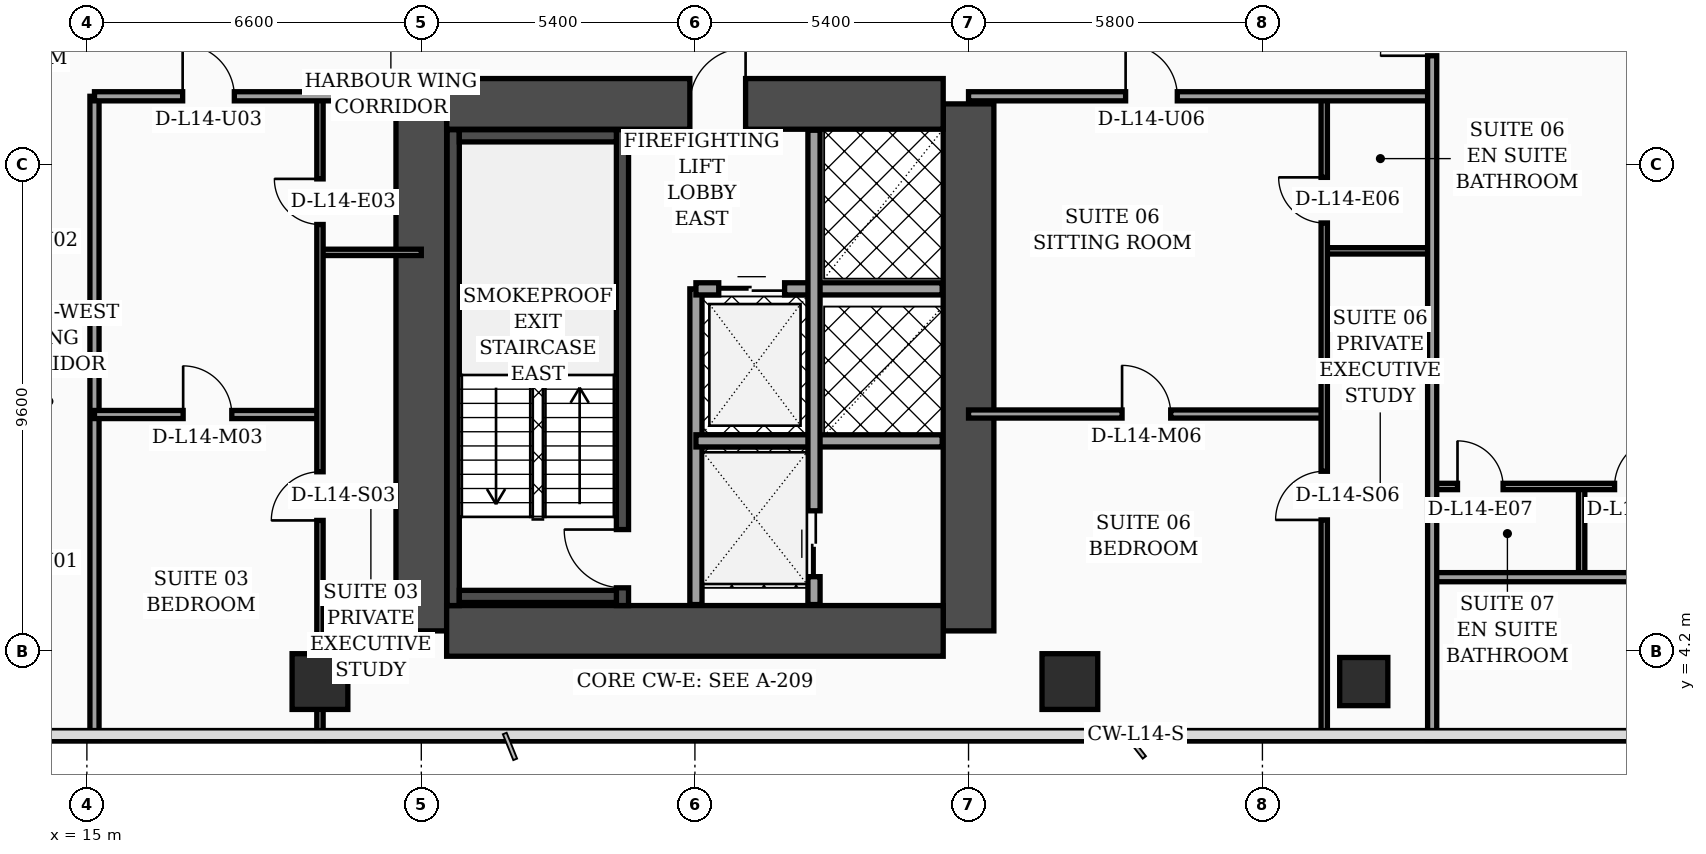
"""IFC4 building model, lengths in metres.
Left out: names, types, materials, properties, quantities, classifications, styles, units other than length and angle.
Written with IfcOpenShell. Run it as: python <this file> out.ifc"""

import sys

from ifc_helpers import new_model, si_unit, direction, frame, frame_2d, origin, origin_2d, place, context, subcontext, project, spatial, rectangle, hollow_rectangle, extrude, element, fill, save


model = new_model("IFC4")
c1 = context("Model", 3, precision=1e-05, world=origin(), true_north=direction((0.0, 1.0)))
c2 = subcontext(c1, "Body", "Model", "MODEL_VIEW")
j1 = project(units=[si_unit("LENGTHUNIT", "METRE"), si_unit("PLANEANGLEUNIT", "RADIAN")], contexts=[c1])
p1 = place(None, origin())
s1 = spatial("IfcSite", under=j1, at=p1, CompositionType="ELEMENT")
p2 = place(p1, origin())
s2 = spatial("IfcBuilding", under=s1, at=p2, CompositionType="ELEMENT")
p3 = place(p2, frame((0.0, 0.0, 62.2)))
s3 = spatial("IfcBuildingStorey", under=s2, at=p3, CompositionType="ELEMENT", Elevation=62.2)
for number, where, z_axis, x_axis in (
    (1, (21.6, 4.6, 0.0), (0.0, 0.0, 1.0), (0.0, 1.0, 0.0)),
    (2, (32.4, 4.6, 0.0), (0.0, 0.0, 1.0), (0.0, 1.0, 0.0)),
):
    element("IfcWall", number, at=place(p3, frame(where, z_axis=z_axis, x_axis=x_axis)), inside=s3, PredefinedType="SHEAR", context=c2, shape_type="SweptSolid", body=[
        extrude(rectangle(XDim=10.4, YDim=1.0, at=frame_2d((5.2, 0.0))), origin(), (0.0, 0.0, 1.0), 3.56),
    ])
p4 = place(p3, frame((22.1, 15.0, 0.0), z_axis=(0.0, 0.0, 1.0), x_axis=(1.0, 0.0, 0.0)))
e3 = element("IfcWall", 3, at=p4, inside=s3, PredefinedType="SHEAR", context=c2, shape_type="SweptSolid", body=[
    extrude(rectangle(XDim=9.8, YDim=1.0, at=frame_2d((4.9, 0.0))), origin(), (0.0, 0.0, 1.0), 3.56),
])
p5 = place(p4, frame((4.8, 0.0, 0.0)))
e4 = element("IfcOpeningElement", 4, at=p5, cuts=e3, PredefinedType="OPENING", context=c2, shape_type="SweptSolid", body=[
    extrude(rectangle(XDim=1.1, YDim=2.2, at=frame_2d((0.55, 1.1))), frame((0.0, 0.51, 0.0), z_axis=(0.0, -1.0, 0.0), x_axis=(1.0, 0.0, 0.0)), (0.0, 0.0, 1.0), 1.02),
])
p6 = place(p3, frame((22.1, 4.6, 0.0), z_axis=(0.0, 0.0, 1.0), x_axis=(1.0, 0.0, 0.0)))
e5 = element("IfcWall", 5, at=p6, inside=s3, PredefinedType="SHEAR", context=c2, shape_type="SweptSolid", body=[
    extrude(rectangle(XDim=9.8, YDim=1.0, at=frame_2d((4.9, 0.0))), origin(), (0.0, 0.0, 1.0), 3.56),
])
p7 = place(p3, frame((22.23, 5.1, 0.0), z_axis=(0.0, 0.0, 1.0), x_axis=(0.0, 1.0, 0.0)))
e6 = element("IfcWall", 6, at=p7, inside=s3, PredefinedType="SOLIDWALL", context=c2, shape_type="SweptSolid", body=[
    extrude(rectangle(XDim=9.39, YDim=0.24, at=frame_2d((4.695, 0.0))), origin(), (0.0, 0.0, 1.0), 3.56),
])
p8 = place(p3, frame((25.57, 5.1, 0.0), z_axis=(0.0, 0.0, 1.0), x_axis=(0.0, 1.0, 0.0)))
e7 = element("IfcWall", 7, at=p8, inside=s3, PredefinedType="SOLIDWALL", context=c2, shape_type="SweptSolid", body=[
    extrude(rectangle(XDim=9.39, YDim=0.24, at=frame_2d((4.695, 0.0))), origin(), (0.0, 0.0, 1.0), 3.56),
])
p9 = place(p8, frame((0.35, 0.0, 0.0)))
e8 = element("IfcOpeningElement", 8, at=p9, cuts=e7, PredefinedType="OPENING", context=c2, shape_type="SweptSolid", body=[
    extrude(rectangle(XDim=1.15, YDim=2.2, at=frame_2d((0.575, 1.1))), frame((0.0, 0.13, 0.0), z_axis=(0.0, -1.0, 0.0), x_axis=(1.0, 0.0, 0.0)), (0.0, 0.0, 1.0), 0.26),
])
for number, where, z_axis, x_axis in (
    (9, (22.35, 5.28, 0.0), (0.0, 0.0, 1.0), (1.0, 0.0, 0.0)),
    (10, (22.35, 14.37, 0.0), (0.0, 0.0, 1.0), (1.0, 0.0, 0.0)),
):
    element("IfcWall", number, at=place(p3, frame(where, z_axis=z_axis, x_axis=x_axis)), inside=s3, PredefinedType="SOLIDWALL", context=c2, shape_type="SweptSolid", body=[
        extrude(rectangle(XDim=3.1, YDim=0.24, at=frame_2d((1.55, 0.0))), origin(), (0.0, 0.0, 1.0), 3.56),
    ])
for number, where, z_axis, x_axis in (
    (11, (19.6, 3.6, 0.0), (0.0, 0.0, 1.0), (1.0, 0.0, 0.0)),
    (12, (34.4, 3.6, 0.0), (0.0, 0.0, 1.0), (1.0, 0.0, 0.0)),
):
    element("IfcColumn", number, at=place(p3, frame(where, z_axis=z_axis, x_axis=x_axis)), inside=s3, PredefinedType="COLUMN", context=c2, shape_type="SweptSolid", body=[
        extrude(hollow_rectangle(XDim=1.1, YDim=1.1, WallThickness=0.045, at=origin_2d()), origin(), (0.0, 0.0, 1.0), 3.56),
    ])
p10 = place(p3, frame((40.2, 3.6, 0.0), z_axis=(0.0, 0.0, 1.0), x_axis=(1.0, 0.0, 0.0)))
e13 = element("IfcColumn", 13, at=p10, inside=s3, PredefinedType="COLUMN", context=c2, shape_type="SweptSolid", body=[
    extrude(hollow_rectangle(XDim=0.95, YDim=0.95, WallThickness=0.04, at=origin_2d()), origin(), (0.0, 0.0, 1.0), 3.56),
])
p11 = place(p3, frame((27.02, 5.12, 0.0), z_axis=(0.0, 0.0, 1.0), x_axis=(0.0, 1.0, 0.0)))
e14 = element("IfcWall", 14, at=p11, inside=s3, PredefinedType="SOLIDWALL", context=c2, shape_type="SweptSolid", body=[
    extrude(rectangle(XDim=6.23, YDim=0.24, at=frame_2d((3.115, 0.0))), origin(), (0.0, 0.0, 1.0), 3.56),
])
p12 = place(p3, frame((27.02, 11.35, 0.0), z_axis=(0.0, 0.0, 1.0), x_axis=(1.0, 0.0, 0.0)))
e15 = element("IfcWall", 15, at=p12, inside=s3, PredefinedType="SOLIDWALL", context=c2, shape_type="SweptSolid", body=[
    extrude(rectangle(XDim=4.86, YDim=0.24, at=frame_2d((2.43, 0.0))), origin(), (0.0, 0.0, 1.0), 3.56),
])
p13 = place(p12, frame((0.45, 0.0, 0.0)))
e16 = element("IfcOpeningElement", 16, at=p13, cuts=e15, PredefinedType="OPENING", context=c2, shape_type="SweptSolid", body=[
    extrude(rectangle(XDim=1.3, YDim=2.35, at=frame_2d((0.65, 1.175))), frame((0.0, 0.13, 0.0), z_axis=(0.0, -1.0, 0.0), x_axis=(1.0, 0.0, 0.0)), (0.0, 0.0, 1.0), 0.26),
])
p14 = place(p3, frame((27.02, 8.35, 0.0), z_axis=(0.0, 0.0, 1.0), x_axis=(1.0, 0.0, 0.0)))
e17 = element("IfcWall", 17, at=p14, inside=s3, PredefinedType="SOLIDWALL", context=c2, shape_type="SweptSolid", body=[
    extrude(rectangle(XDim=4.86, YDim=0.24, at=frame_2d((2.43, 0.0))), origin(), (0.0, 0.0, 1.0), 3.56),
])
p15 = place(p3, frame((29.35, 5.12, 0.0), z_axis=(0.0, 0.0, 1.0), x_axis=(0.0, 1.0, 0.0)))
e18 = element("IfcWall", 18, at=p15, inside=s3, PredefinedType="SOLIDWALL", context=c2, shape_type="SweptSolid", body=[
    extrude(rectangle(XDim=9.36, YDim=0.24, at=frame_2d((4.68, 0.0))), origin(), (0.0, 0.0, 1.0), 3.56),
])
p16 = place(p15, frame((0.55, 0.0, 0.0)))
e19 = element("IfcOpeningElement", 19, at=p16, cuts=e18, PredefinedType="OPENING", context=c2, shape_type="SweptSolid", body=[
    extrude(rectangle(XDim=1.3, YDim=2.35, at=frame_2d((0.65, 1.175))), frame((0.0, 0.13, 0.0), z_axis=(0.0, -1.0, 0.0), x_axis=(1.0, 0.0, 0.0)), (0.0, 0.0, 1.0), 0.26),
])
p17 = place(p3, frame((15.15, 2.44, 0.0), z_axis=(0.0, 0.0, 1.0), x_axis=(0.0, 1.0, 0.0)))
e20 = element("IfcWall", 20, at=p17, inside=s3, PredefinedType="PARTITIONING", context=c2, shape_type="SweptSolid", body=[
    extrude(rectangle(XDim=12.71, YDim=0.18, at=frame_2d((6.355, 0.0))), origin(), (0.0, 0.0, 1.0), 3.04),
])
p18 = place(p3, frame((19.6, 12.07, 0.0), z_axis=(0.0, 0.0, 1.0), x_axis=(1.0, 0.0, 0.0)))
e21 = element("IfcWall", 21, at=p18, inside=s3, PredefinedType="PARTITIONING", context=c2, shape_type="SweptSolid", body=[
    extrude(rectangle(XDim=2.0, YDim=0.125, at=frame_2d((1.0, 0.0))), origin(), (0.0, 0.0, 1.0), 3.56),
])
p19 = place(p3, frame((15.15, 8.87, 0.0), z_axis=(0.0, 0.0, 1.0), x_axis=(1.0, 0.0, 0.0)))
e22 = element("IfcWall", 22, at=p19, inside=s3, PredefinedType="PARTITIONING", context=c2, shape_type="SweptSolid", body=[
    extrude(rectangle(XDim=4.45, YDim=0.16, at=frame_2d((2.225, 0.0))), origin(), (0.0, 0.0, 1.0), 3.56),
])
p20 = place(p19, frame((1.75, 0.0, 0.0)))
e23 = element("IfcOpeningElement", 23, at=p20, cuts=e22, PredefinedType="OPENING", context=c2, shape_type="SweptSolid", body=[
    extrude(rectangle(XDim=0.96, YDim=2.2, at=frame_2d((0.48, 1.1))), frame((0.0, 0.09, 0.0), z_axis=(0.0, -1.0, 0.0), x_axis=(1.0, 0.0, 0.0)), (0.0, 0.0, 1.0), 0.18),
])
p21 = place(p3, frame((19.6, 2.44, 0.0), z_axis=(0.0, 0.0, 1.0), x_axis=(0.0, 1.0, 0.0)))
e24 = element("IfcWall", 24, at=p21, inside=s3, PredefinedType="PARTITIONING", context=c2, shape_type="SweptSolid", body=[
    extrude(rectangle(XDim=12.71, YDim=0.125, at=frame_2d((6.355, 0.0))), origin(), (0.0, 0.0, 1.0), 2.34),
])
p22 = place(p21, frame((4.34, 0.0, 0.0)))
e25 = element("IfcOpeningElement", 25, at=p22, cuts=e24, PredefinedType="OPENING", context=c2, shape_type="SweptSolid", body=[
    extrude(rectangle(XDim=0.96, YDim=2.2, at=frame_2d((0.48, 1.1))), frame((0.0, 0.073, 0.0), z_axis=(0.0, -1.0, 0.0), x_axis=(1.0, 0.0, 0.0)), (0.0, 0.0, 1.0), 0.145),
])
p23 = place(p21, frame((10.18, 0.0, 0.0)))
e26 = element("IfcOpeningElement", 26, at=p23, cuts=e24, PredefinedType="OPENING", context=c2, shape_type="SweptSolid", body=[
    extrude(rectangle(XDim=0.9, YDim=2.15, at=frame_2d((0.45, 1.075))), frame((0.0, 0.073, 0.0), z_axis=(0.0, -1.0, 0.0), x_axis=(1.0, 0.0, 0.0)), (0.0, 0.0, 1.0), 0.145),
])
p24 = place(p3, frame((15.15, 15.15, 0.0), z_axis=(0.0, 0.0, 1.0), x_axis=(1.0, 0.0, 0.0)))
e27 = element("IfcWall", 27, at=p24, inside=s3, PredefinedType="PARTITIONING", context=c2, shape_type="SweptSolid", body=[
    extrude(rectangle(XDim=6.45, YDim=0.18, at=frame_2d((3.225, 0.0))), origin(), (0.0, 0.0, 1.0), 2.34),
])
p25 = place(p24, frame((1.74, 0.0, 0.0)))
e28 = element("IfcOpeningElement", 28, at=p25, cuts=e27, PredefinedType="OPENING", context=c2, shape_type="SweptSolid", body=[
    extrude(rectangle(XDim=1.02, YDim=2.2, at=frame_2d((0.51, 1.1))), frame((0.0, 0.1, 0.0), z_axis=(0.0, -1.0, 0.0), x_axis=(1.0, 0.0, 0.0)), (0.0, 0.0, 1.0), 0.2),
])
p26 = place(p3, frame((39.42, 12.1, 0.0), z_axis=(0.0, 0.0, 1.0), x_axis=(1.0, 0.0, 0.0)))
e29 = element("IfcWall", 29, at=p26, inside=s3, PredefinedType="PARTITIONING", context=c2, shape_type="SweptSolid", body=[
    extrude(rectangle(XDim=2.13, YDim=0.125, at=frame_2d((1.065, 0.0))), origin(), (0.0, 0.0, 1.0), 3.56),
])
p27 = place(p3, frame((32.4, 8.88, 0.0), z_axis=(0.0, 0.0, 1.0), x_axis=(1.0, 0.0, 0.0)))
e30 = element("IfcWall", 30, at=p27, inside=s3, PredefinedType="PARTITIONING", context=c2, shape_type="SweptSolid", body=[
    extrude(rectangle(XDim=7.02, YDim=0.16, at=frame_2d((3.51, 0.0))), origin(), (0.0, 0.0, 1.0), 2.84),
])
p28 = place(p27, frame((3.03, 0.0, 0.0)))
e31 = element("IfcOpeningElement", 31, at=p28, cuts=e30, PredefinedType="OPENING", context=c2, shape_type="SweptSolid", body=[
    extrude(rectangle(XDim=0.96, YDim=2.2, at=frame_2d((0.48, 1.1))), frame((0.0, 0.09, 0.0), z_axis=(0.0, -1.0, 0.0), x_axis=(1.0, 0.0, 0.0)), (0.0, 0.0, 1.0), 0.18),
])
p29 = place(p3, frame((39.42, 2.44, 0.0), z_axis=(0.0, 0.0, 1.0), x_axis=(0.0, 1.0, 0.0)))
e32 = element("IfcWall", 32, at=p29, inside=s3, PredefinedType="PARTITIONING", context=c2, shape_type="SweptSolid", body=[
    extrude(rectangle(XDim=12.71, YDim=0.125, at=frame_2d((6.355, 0.0))), origin(), (0.0, 0.0, 1.0), 2.84),
])
p30 = place(p29, frame((4.35, 0.0, 0.0)))
e33 = element("IfcOpeningElement", 33, at=p30, cuts=e32, PredefinedType="OPENING", context=c2, shape_type="SweptSolid", body=[
    extrude(rectangle(XDim=0.96, YDim=2.2, at=frame_2d((0.48, 1.1))), frame((0.0, 0.073, 0.0), z_axis=(0.0, -1.0, 0.0), x_axis=(1.0, 0.0, 0.0)), (0.0, 0.0, 1.0), 0.145),
])
p31 = place(p29, frame((10.21, 0.0, 0.0)))
e34 = element("IfcOpeningElement", 34, at=p31, cuts=e32, PredefinedType="OPENING", context=c2, shape_type="SweptSolid", body=[
    extrude(rectangle(XDim=0.9, YDim=2.15, at=frame_2d((0.45, 1.075))), frame((0.0, 0.073, 0.0), z_axis=(0.0, -1.0, 0.0), x_axis=(1.0, 0.0, 0.0)), (0.0, 0.0, 1.0), 0.145),
])
p32 = place(p3, frame((32.4, 15.15, 0.0), z_axis=(0.0, 0.0, 1.0), x_axis=(1.0, 0.0, 0.0)))
e35 = element("IfcWall", 35, at=p32, inside=s3, PredefinedType="PARTITIONING", context=c2, shape_type="SweptSolid", body=[
    extrude(rectangle(XDim=9.15, YDim=0.18, at=frame_2d((4.575, 0.0))), origin(), (0.0, 0.0, 1.0), 2.84),
])
p33 = place(p32, frame((3.1, 0.0, 0.0)))
e36 = element("IfcOpeningElement", 36, at=p33, cuts=e35, PredefinedType="OPENING", context=c2, shape_type="SweptSolid", body=[
    extrude(rectangle(XDim=1.02, YDim=2.2, at=frame_2d((0.51, 1.1))), frame((0.0, 0.1, 0.0), z_axis=(0.0, -1.0, 0.0), x_axis=(1.0, 0.0, 0.0)), (0.0, 0.0, 1.0), 0.2),
])
p34 = place(p3, frame((44.5, 5.66, 0.0), z_axis=(0.0, 0.0, 1.0), x_axis=(0.0, 1.0, 0.0)))
e37 = element("IfcWall", 37, at=p34, inside=s3, PredefinedType="PARTITIONING", context=c2, shape_type="SweptSolid", body=[
    extrude(rectangle(XDim=1.79, YDim=0.125, at=frame_2d((0.895, 0.0))), origin(), (0.0, 0.0, 1.0), 3.56),
])
p35 = place(p3, frame((41.55, 7.45, 0.0), z_axis=(0.0, 0.0, 1.0), x_axis=(1.0, 0.0, 0.0)))
e38 = element("IfcWall", 38, at=p35, inside=s3, PredefinedType="PARTITIONING", context=c2, shape_type="SweptSolid", body=[
    extrude(rectangle(XDim=21.41, YDim=0.125, at=frame_2d((10.705, 0.0))), origin(), (0.0, 0.0, 1.0), 2.84),
])
p36 = place(p35, frame((0.5, 0.0, 0.0)))
e39 = element("IfcOpeningElement", 39, at=p36, cuts=e38, PredefinedType="OPENING", context=c2, shape_type="SweptSolid", body=[
    extrude(rectangle(XDim=0.9, YDim=2.15, at=frame_2d((0.45, 1.075))), frame((0.0, 0.073, 0.0), z_axis=(0.0, -1.0, 0.0), x_axis=(1.0, 0.0, 0.0)), (0.0, 0.0, 1.0), 0.145),
])
p37 = place(p35, frame((3.6, 0.0, 0.0)))
e40 = element("IfcOpeningElement", 40, at=p37, cuts=e38, PredefinedType="OPENING", context=c2, shape_type="SweptSolid", body=[
    extrude(rectangle(XDim=0.96, YDim=2.2, at=frame_2d((0.48, 1.1))), frame((0.0, 0.073, 0.0), z_axis=(0.0, -1.0, 0.0), x_axis=(1.0, 0.0, 0.0)), (0.0, 0.0, 1.0), 0.145),
])
p38 = place(p3, frame((41.55, 5.66, 0.0), z_axis=(0.0, 0.0, 1.0), x_axis=(1.0, 0.0, 0.0)))
e41 = element("IfcWall", 41, at=p38, inside=s3, PredefinedType="PARTITIONING", context=c2, shape_type="SweptSolid", body=[
    extrude(rectangle(XDim=18.85, YDim=0.18, at=frame_2d((9.425, 0.0))), origin(), (0.0, 0.0, 1.0), 2.84),
])
p39 = place(p3, frame((41.55, 2.44, 0.0), z_axis=(0.0, 0.0, 1.0), x_axis=(0.0, 1.0, 0.0)))
e42 = element("IfcWall", 42, at=p39, inside=s3, PredefinedType="PARTITIONING", context=c2, shape_type="SweptSolid", body=[
    extrude(rectangle(XDim=31.04, YDim=0.18, at=frame_2d((15.52, 0.0))), origin(), (0.0, 0.0, 1.0), 2.84),
])
p40 = place(p39, frame((13.51, 0.0, 0.0)))
e43 = element("IfcOpeningElement", 43, at=p40, cuts=e42, PredefinedType="OPENING", context=c2, shape_type="SweptSolid", body=[
    extrude(rectangle(XDim=1.02, YDim=2.2, at=frame_2d((0.51, 1.1))), frame((0.0, 0.1, 0.0), z_axis=(0.0, -1.0, 0.0), x_axis=(1.0, 0.0, 0.0)), (0.0, 0.0, 1.0), 0.2),
])
p41 = place(p39, frame((17.77, 0.0, 0.0)))
e44 = element("IfcOpeningElement", 44, at=p41, cuts=e42, PredefinedType="OPENING", context=c2, shape_type="SweptSolid", body=[
    extrude(rectangle(XDim=1.02, YDim=2.2, at=frame_2d((0.51, 1.1))), frame((0.0, 0.1, 0.0), z_axis=(0.0, -1.0, 0.0), x_axis=(1.0, 0.0, 0.0)), (0.0, 0.0, 1.0), 0.2),
])
p42 = place(p39, frame((25.58, 0.0, 0.0)))
e45 = element("IfcOpeningElement", 45, at=p42, cuts=e42, PredefinedType="OPENING", context=c2, shape_type="SweptSolid", body=[
    extrude(rectangle(XDim=1.02, YDim=2.2, at=frame_2d((0.51, 1.1))), frame((0.0, 0.1, 0.0), z_axis=(0.0, -1.0, 0.0), x_axis=(1.0, 0.0, 0.0)), (0.0, 0.0, 1.0), 0.2),
])
p43 = place(p13, origin())
e46 = element("IfcDoor", 46, at=p43, inside=s3, OperationType="DOUBLE_DOOR_SLIDING", PredefinedType="DOOR", context=c2, shape_type="SweptSolid", body=[
    extrude(rectangle(XDim=1.3, YDim=2.35, at=frame_2d((0.65, 1.175))), frame((0.0, 0.025, 0.0), z_axis=(0.0, -1.0, 0.0), x_axis=(1.0, 0.0, 0.0)), (0.0, 0.0, 1.0), 0.05),
])
fill(e16, e46)
p44 = place(p16, origin())
e47 = element("IfcDoor", 47, at=p44, inside=s3, OperationType="DOUBLE_DOOR_SLIDING", PredefinedType="DOOR", context=c2, shape_type="SweptSolid", body=[
    extrude(rectangle(XDim=1.3, YDim=2.35, at=frame_2d((0.65, 1.175))), frame((0.0, 0.025, 0.0), z_axis=(0.0, -1.0, 0.0), x_axis=(1.0, 0.0, 0.0)), (0.0, 0.0, 1.0), 0.05),
])
fill(e19, e47)
p45 = place(p20, origin())
e48 = element("IfcDoor", 48, at=p45, inside=s3, OperationType="SINGLE_SWING_LEFT", PredefinedType="DOOR", context=c2, shape_type="SweptSolid", body=[
    extrude(rectangle(XDim=0.96, YDim=2.2, at=frame_2d((0.48, 1.1))), frame((0.0, 0.025, 0.0), z_axis=(0.0, -1.0, 0.0), x_axis=(1.0, 0.0, 0.0)), (0.0, 0.0, 1.0), 0.05),
])
fill(e23, e48)
p46 = place(p22, origin())
e49 = element("IfcDoor", 49, at=p46, inside=s3, OperationType="SINGLE_SWING_LEFT", PredefinedType="DOOR", context=c2, shape_type="SweptSolid", body=[
    extrude(rectangle(XDim=0.96, YDim=2.2, at=frame_2d((0.48, 1.1))), frame((0.0, 0.025, 0.0), z_axis=(0.0, -1.0, 0.0), x_axis=(1.0, 0.0, 0.0)), (0.0, 0.0, 1.0), 0.05),
])
fill(e25, e49)
p47 = place(p23, origin())
e50 = element("IfcDoor", 50, at=p47, inside=s3, OperationType="SINGLE_SWING_RIGHT", PredefinedType="DOOR", context=c2, shape_type="SweptSolid", body=[
    extrude(rectangle(XDim=0.9, YDim=2.15, at=frame_2d((0.45, 1.075))), frame((0.0, 0.025, 0.0), z_axis=(0.0, -1.0, 0.0), x_axis=(1.0, 0.0, 0.0)), (0.0, 0.0, 1.0), 0.05),
])
fill(e26, e50)
p48 = place(p25, origin())
e51 = element("IfcDoor", 51, at=p48, inside=s3, OperationType="SINGLE_SWING_LEFT", PredefinedType="DOOR", context=c2, shape_type="SweptSolid", body=[
    extrude(rectangle(XDim=1.02, YDim=2.2, at=frame_2d((0.51, 1.1))), frame((0.0, 0.025, 0.0), z_axis=(0.0, -1.0, 0.0), x_axis=(1.0, 0.0, 0.0)), (0.0, 0.0, 1.0), 0.05),
])
fill(e28, e51)
p49 = place(p28, origin())
e52 = element("IfcDoor", 52, at=p49, inside=s3, OperationType="SINGLE_SWING_LEFT", PredefinedType="DOOR", context=c2, shape_type="SweptSolid", body=[
    extrude(rectangle(XDim=0.96, YDim=2.2, at=frame_2d((0.48, 1.1))), frame((0.0, 0.025, 0.0), z_axis=(0.0, -1.0, 0.0), x_axis=(1.0, 0.0, 0.0)), (0.0, 0.0, 1.0), 0.05),
])
fill(e31, e52)
p50 = place(p30, origin())
e53 = element("IfcDoor", 53, at=p50, inside=s3, OperationType="SINGLE_SWING_LEFT", PredefinedType="DOOR", context=c2, shape_type="SweptSolid", body=[
    extrude(rectangle(XDim=0.96, YDim=2.2, at=frame_2d((0.48, 1.1))), frame((0.0, 0.025, 0.0), z_axis=(0.0, -1.0, 0.0), x_axis=(1.0, 0.0, 0.0)), (0.0, 0.0, 1.0), 0.05),
])
fill(e33, e53)
p51 = place(p31, origin())
e54 = element("IfcDoor", 54, at=p51, inside=s3, OperationType="SINGLE_SWING_RIGHT", PredefinedType="DOOR", context=c2, shape_type="SweptSolid", body=[
    extrude(rectangle(XDim=0.9, YDim=2.15, at=frame_2d((0.45, 1.075))), frame((0.0, 0.025, 0.0), z_axis=(0.0, -1.0, 0.0), x_axis=(1.0, 0.0, 0.0)), (0.0, 0.0, 1.0), 0.05),
])
fill(e34, e54)
p52 = place(p33, origin())
e55 = element("IfcDoor", 55, at=p52, inside=s3, OperationType="SINGLE_SWING_LEFT", PredefinedType="DOOR", context=c2, shape_type="SweptSolid", body=[
    extrude(rectangle(XDim=1.02, YDim=2.2, at=frame_2d((0.51, 1.1))), frame((0.0, 0.025, 0.0), z_axis=(0.0, -1.0, 0.0), x_axis=(1.0, 0.0, 0.0)), (0.0, 0.0, 1.0), 0.05),
])
fill(e36, e55)
p53 = place(p36, origin())
e56 = element("IfcDoor", 56, at=p53, inside=s3, OperationType="SINGLE_SWING_LEFT", PredefinedType="DOOR", context=c2, shape_type="SweptSolid", body=[
    extrude(rectangle(XDim=0.9, YDim=2.15, at=frame_2d((0.45, 1.075))), frame((0.0, 0.025, 0.0), z_axis=(0.0, -1.0, 0.0), x_axis=(1.0, 0.0, 0.0)), (0.0, 0.0, 1.0), 0.05),
])
fill(e39, e56)
p54 = place(p37, origin())
e57 = element("IfcDoor", 57, at=p54, inside=s3, OperationType="SINGLE_SWING_RIGHT", PredefinedType="DOOR", context=c2, shape_type="SweptSolid", body=[
    extrude(rectangle(XDim=0.96, YDim=2.2, at=frame_2d((0.48, 1.1))), frame((0.0, 0.025, 0.0), z_axis=(0.0, -1.0, 0.0), x_axis=(1.0, 0.0, 0.0)), (0.0, 0.0, 1.0), 0.05),
])
fill(e40, e57)
p55 = place(p40, origin())
e58 = element("IfcDoor", 58, at=p55, inside=s3, OperationType="SINGLE_SWING_LEFT", PredefinedType="DOOR", context=c2, shape_type="SweptSolid", body=[
    extrude(rectangle(XDim=1.02, YDim=2.2, at=frame_2d((0.51, 1.1))), frame((0.0, 0.025, 0.0), z_axis=(0.0, -1.0, 0.0), x_axis=(1.0, 0.0, 0.0)), (0.0, 0.0, 1.0), 0.05),
])
fill(e43, e58)
p56 = place(p9, origin())
e59 = element("IfcDoor", 59, at=p56, inside=s3, OperationType="SINGLE_SWING_RIGHT", PredefinedType="DOOR", context=c2, shape_type="SweptSolid", body=[
    extrude(rectangle(XDim=1.15, YDim=2.2, at=frame_2d((0.575, 1.1))), frame((0.0, 0.025, 0.0), z_axis=(0.0, -1.0, 0.0), x_axis=(1.0, 0.0, 0.0)), (0.0, 0.0, 1.0), 0.05),
])
fill(e8, e59)
p57 = place(p5, origin())
e60 = element("IfcDoor", 60, at=p57, inside=s3, OperationType="SINGLE_SWING_RIGHT", PredefinedType="DOOR", context=c2, shape_type="SweptSolid", body=[
    extrude(rectangle(XDim=1.1, YDim=2.2, at=frame_2d((0.55, 1.1))), frame((0.0, 0.025, 0.0), z_axis=(0.0, -1.0, 0.0), x_axis=(1.0, 0.0, 0.0)), (0.0, 0.0, 1.0), 0.05),
])
fill(e4, e60)
save(model, sys.argv[1])
